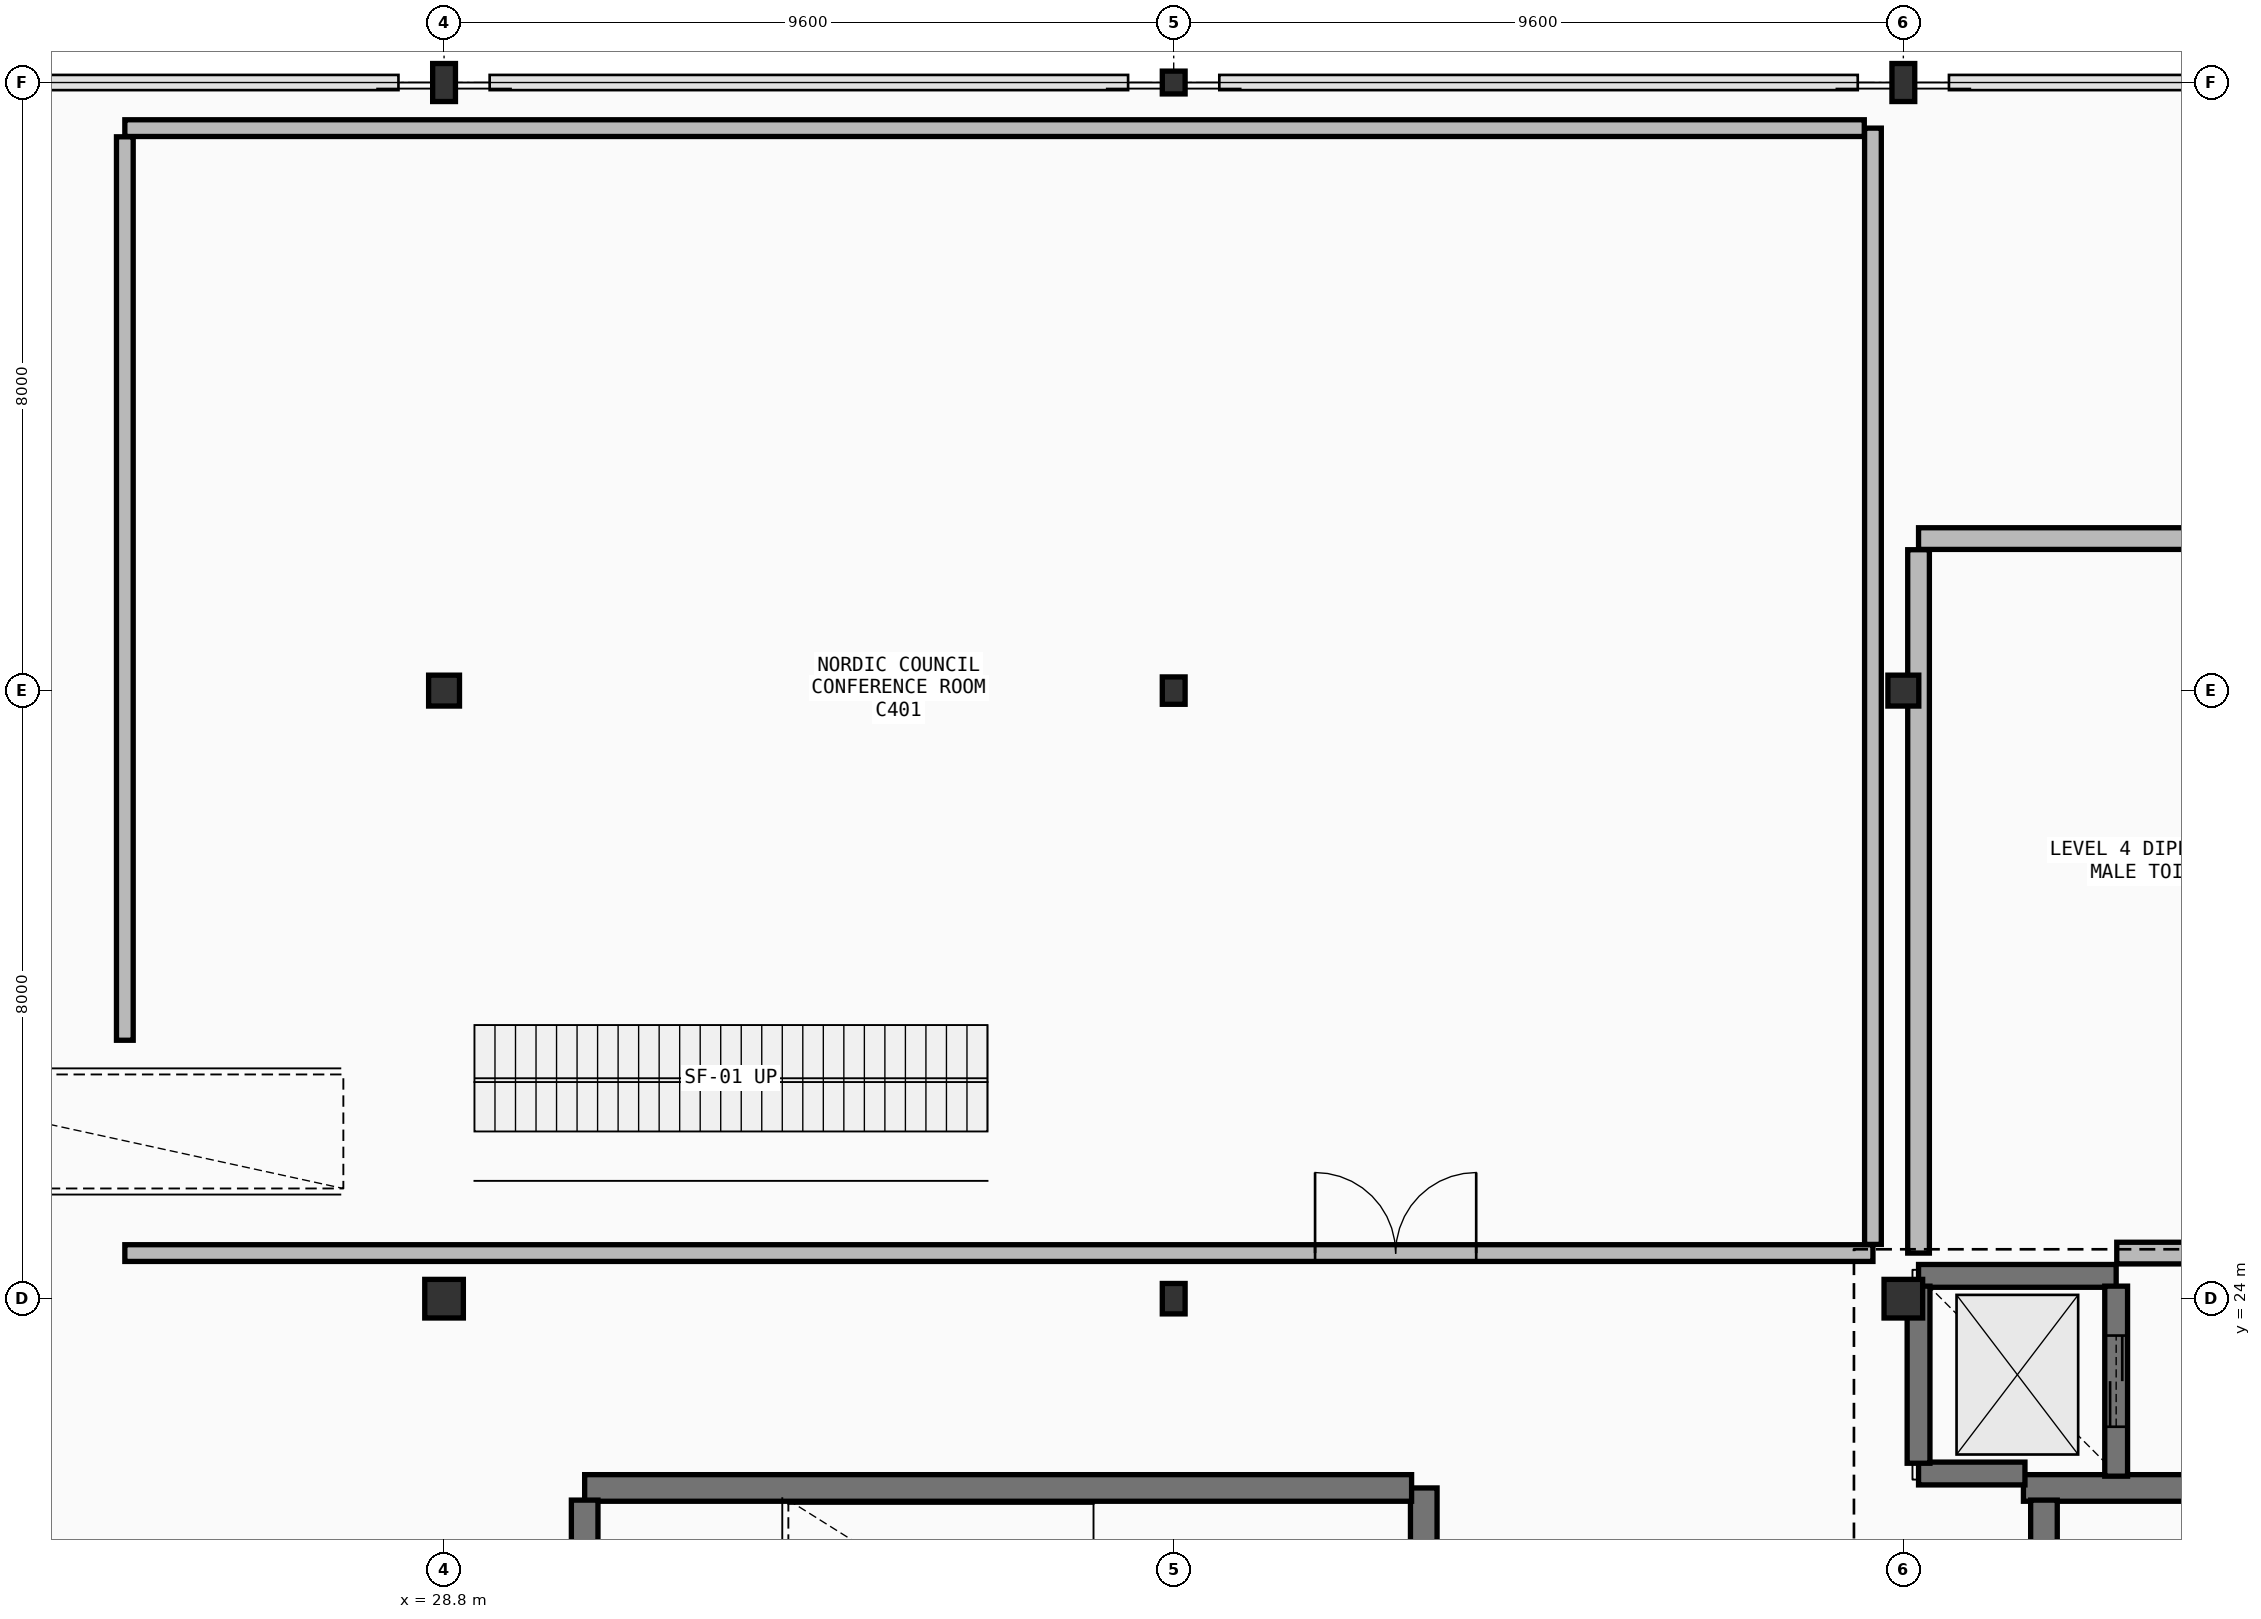
"""IFC4 building model, lengths in metres.
Left out: names, types, materials, properties, quantities, classifications, styles, units other than length and angle.
Written with IfcOpenShell. Run it as: python <this file> out.ifc"""

import sys

from ifc_helpers import new_model, si_unit, direction, frame, frame_2d, origin, origin_2d, place, context, subcontext, project, spatial, rectangle, hollow_circle, i_section, extrude, element, fill, save


model = new_model("IFC4")
c1 = context("Model", 3, precision=1e-05, world=origin(), true_north=direction((0.0, 1.0)))
c2 = subcontext(c1, "Body", "Model", "MODEL_VIEW")
j1 = project(units=[si_unit("LENGTHUNIT", "METRE"), si_unit("PLANEANGLEUNIT", "RADIAN")], contexts=[c1])
p1 = place(None, origin())
s1 = spatial("IfcSite", under=j1, at=p1, CompositionType="ELEMENT")
p2 = place(p1, origin())
s2 = spatial("IfcBuilding", under=s1, at=p2, CompositionType="ELEMENT")
p3 = place(p2, frame((0.0, 0.0, 20.4)))
s3 = spatial("IfcBuildingStorey", under=s2, at=p3, CompositionType="ELEMENT", Elevation=20.4)
p4 = place(p3, frame((28.8, 24.0, 0.0), z_axis=(0.0, 0.0, 1.0), x_axis=(1.0, 0.0, 0.0)))
e1 = element("IfcColumn", 1, at=p4, inside=s3, PredefinedType="COLUMN", context=c2, shape_type="SweptSolid", body=[
    extrude(hollow_circle(Radius=0.254, WallThickness=0.025, at=origin_2d()), origin(), (0.0, 0.0, 1.0), 4.5),
])
p5 = place(p3, frame((28.8, 32.0, 0.0), z_axis=(0.0, 0.0, 1.0), x_axis=(1.0, 0.0, 0.0)))
e2 = element("IfcColumn", 2, at=p5, inside=s3, PredefinedType="COLUMN", context=c2, shape_type="SweptSolid", body=[
    extrude(hollow_circle(Radius=0.203, WallThickness=0.02, at=origin_2d()), origin(), (0.0, 0.0, 1.0), 4.5),
])
p6 = place(p3, frame((28.8, 40.0, 0.0), z_axis=(0.0, 0.0, 1.0), x_axis=(1.0, 0.0, 0.0)))
e3 = element("IfcColumn", 3, at=p6, inside=s3, PredefinedType="COLUMN", context=c2, shape_type="SweptSolid", body=[
    extrude(i_section(OverallWidth=0.3, OverallDepth=0.5, WebThickness=0.014, FlangeThickness=0.028, FilletRadius=0.027, at=origin_2d()), origin(), (0.0, 0.0, 1.0), 4.5),
])
p7 = place(p3, frame((38.4, 24.0, 0.0), z_axis=(0.0, 0.0, 1.0), x_axis=(1.0, 0.0, 0.0)))
e4 = element("IfcColumn", 4, at=p7, inside=s3, PredefinedType="COLUMN", context=c2, shape_type="SweptSolid", body=[
    extrude(i_section(OverallWidth=0.3, OverallDepth=0.4, WebThickness=0.013, FlangeThickness=0.024, FilletRadius=0.027, at=origin_2d()), origin(), (0.0, 0.0, 1.0), 4.5),
])
p8 = place(p3, frame((38.4, 32.0, 0.0), z_axis=(0.0, 0.0, 1.0), x_axis=(1.0, 0.0, 0.0)))
e5 = element("IfcColumn", 5, at=p8, inside=s3, PredefinedType="COLUMN", context=c2, shape_type="SweptSolid", body=[
    extrude(i_section(OverallWidth=0.3, OverallDepth=0.36, WebThickness=0.012, FlangeThickness=0.022, FilletRadius=0.027, at=origin_2d()), origin(), (0.0, 0.0, 1.0), 4.5),
])
p9 = place(p3, frame((38.4, 40.0, 0.0), z_axis=(0.0, 0.0, 1.0), x_axis=(1.0, 0.0, 0.0)))
e6 = element("IfcColumn", 6, at=p9, inside=s3, PredefinedType="COLUMN", context=c2, shape_type="SweptSolid", body=[
    extrude(i_section(OverallWidth=0.3, OverallDepth=0.3, WebThickness=0.011, FlangeThickness=0.019, FilletRadius=0.027, at=origin_2d()), origin(), (0.0, 0.0, 1.0), 4.5),
])
p10 = place(p3, frame((48.0, 24.0, 0.0), z_axis=(0.0, 0.0, 1.0), x_axis=(1.0, 0.0, 0.0)))
e7 = element("IfcColumn", 7, at=p10, inside=s3, PredefinedType="COLUMN", context=c2, shape_type="SweptSolid", body=[
    extrude(hollow_circle(Radius=0.254, WallThickness=0.025, at=origin_2d()), origin(), (0.0, 0.0, 1.0), 4.5),
])
p11 = place(p3, frame((48.0, 32.0, 0.0), z_axis=(0.0, 0.0, 1.0), x_axis=(1.0, 0.0, 0.0)))
e8 = element("IfcColumn", 8, at=p11, inside=s3, PredefinedType="COLUMN", context=c2, shape_type="SweptSolid", body=[
    extrude(hollow_circle(Radius=0.203, WallThickness=0.02, at=origin_2d()), origin(), (0.0, 0.0, 1.0), 4.5),
])
p12 = place(p3, frame((48.0, 40.0, 0.0), z_axis=(0.0, 0.0, 1.0), x_axis=(1.0, 0.0, 0.0)))
e9 = element("IfcColumn", 9, at=p12, inside=s3, PredefinedType="COLUMN", context=c2, shape_type="SweptSolid", body=[
    extrude(i_section(OverallWidth=0.3, OverallDepth=0.5, WebThickness=0.014, FlangeThickness=0.028, FilletRadius=0.027, at=origin_2d()), origin(), (0.0, 0.0, 1.0), 4.5),
])
p13 = place(p3, frame((60.73, 21.51, 0.0), z_axis=(0.0, 0.0, 1.0), x_axis=(-1.0, 0.0, 0.0)))
e10 = element("IfcWall", 10, at=p13, inside=s3, PredefinedType="SHEAR", context=c2, shape_type="SweptSolid", body=[
    extrude(rectangle(XDim=11.15, YDim=0.35, at=frame_2d((5.575, 0.0))), origin(), (0.0, 0.0, 1.0), 4.25),
])
p14 = place(p3, frame((49.85, 21.35, 0.0), z_axis=(0.0, 0.0, 1.0), x_axis=(0.0, -1.0, 0.0)))
e11 = element("IfcWall", 11, at=p14, inside=s3, PredefinedType="SHEAR", context=c2, shape_type="SweptSolid", body=[
    extrude(rectangle(XDim=5.14, YDim=0.35, at=frame_2d((2.57, 0.0))), origin(), (0.0, 0.0, 1.0), 4.25),
])
p15 = place(p3, frame((41.69, 16.21, 0.0), z_axis=(0.0, 0.0, 1.0), x_axis=(0.0, 1.0, 0.0)))
e12 = element("IfcWall", 12, at=p15, inside=s3, PredefinedType="SHEAR", context=c2, shape_type="SweptSolid", body=[
    extrude(rectangle(XDim=5.3, YDim=0.35, at=frame_2d((2.65, 0.0))), origin(), (0.0, 0.0, 1.0), 4.25),
])
p16 = place(p3, frame((41.53, 21.51, 0.0), z_axis=(0.0, 0.0, 1.0), x_axis=(-1.0, 0.0, 0.0)))
e13 = element("IfcWall", 13, at=p16, inside=s3, PredefinedType="SHEAR", context=c2, shape_type="SweptSolid", body=[
    extrude(rectangle(XDim=10.88, YDim=0.35, at=frame_2d((5.44, 0.0))), origin(), (0.0, 0.0, 1.0), 4.25),
])
p17 = place(p3, frame((30.65, 21.35, 0.0), z_axis=(0.0, 0.0, 1.0), x_axis=(0.0, -1.0, 0.0)))
e14 = element("IfcWall", 14, at=p17, inside=s3, PredefinedType="SHEAR", context=c2, shape_type="SweptSolid", body=[
    extrude(rectangle(XDim=5.14, YDim=0.35, at=frame_2d((2.57, 0.0))), origin(), (0.0, 0.0, 1.0), 4.25),
])
p18 = place(p3, frame((50.8, 24.3, 0.0), z_axis=(0.0, 0.0, 1.0), x_axis=(-1.0, 0.0, 0.0)))
e15 = element("IfcWall", 15, at=p18, inside=s3, PredefinedType="SHEAR", context=c2, shape_type="SweptSolid", body=[
    extrude(rectangle(XDim=2.6, YDim=0.3, at=frame_2d((1.3, 0.0))), origin(), (0.0, 0.0, 1.0), 4.25),
])
p19 = place(p3, frame((48.2, 21.7, 0.0), z_axis=(0.0, 0.0, 1.0), x_axis=(1.0, 0.0, 0.0)))
e16 = element("IfcWall", 16, at=p19, inside=s3, PredefinedType="SHEAR", context=c2, shape_type="SweptSolid", body=[
    extrude(rectangle(XDim=1.4, YDim=0.3, at=frame_2d((0.7, 0.0))), origin(), (0.0, 0.0, 1.0), 4.25),
])
p20 = place(p3, frame((50.8, 21.665, 0.0), z_axis=(0.0, 0.0, 1.0), x_axis=(0.0, 1.0, 0.0)))
e17 = element("IfcWall", 17, at=p20, inside=s3, PredefinedType="SHEAR", context=c2, shape_type="SweptSolid", body=[
    extrude(rectangle(XDim=2.5, YDim=0.3, at=frame_2d((1.25, 0.0))), origin(), (0.0, 0.0, 1.0), 4.25),
])
p21 = place(p20, frame((0.65, 0.0, 0.0)))
e18 = element("IfcOpeningElement", 18, at=p21, cuts=e17, PredefinedType="OPENING", context=c2, shape_type="SweptSolid", body=[
    extrude(rectangle(XDim=1.2, YDim=2.2, at=frame_2d((0.6, 1.1))), frame((0.0, 0.16, 0.0), z_axis=(0.0, -1.0, 0.0), x_axis=(1.0, 0.0, 0.0)), (0.0, 0.0, 1.0), 0.32),
])
p22 = place(p3, frame((48.2, 24.165, 0.0), z_axis=(0.0, 0.0, 1.0), x_axis=(0.0, -1.0, 0.0)))
e19 = element("IfcWall", 19, at=p22, inside=s3, PredefinedType="SHEAR", context=c2, shape_type="SweptSolid", body=[
    extrude(rectangle(XDim=2.33, YDim=0.3, at=frame_2d((1.165, 0.0))), origin(), (0.0, 0.0, 1.0), 4.25),
])
p23 = place(p3, frame((24.6, 24.6, 0.0), z_axis=(0.0, 0.0, 1.0), x_axis=(1.0, 0.0, 0.0)))
e20 = element("IfcWall", 20, at=p23, inside=s3, PredefinedType="PARTITIONING", context=c2, shape_type="SweptSolid", body=[
    extrude(rectangle(XDim=23.0, YDim=0.22, at=frame_2d((11.5, 0.0))), origin(), (0.0, 0.0, 1.0), 3.32),
])
p24 = place(p23, frame((15.66, 0.0, 0.0)))
e21 = element("IfcOpeningElement", 21, at=p24, cuts=e20, PredefinedType="OPENING", context=c2, shape_type="SweptSolid", body=[
    extrude(rectangle(XDim=2.12, YDim=2.38, at=frame_2d((1.06, 1.19))), frame((0.0, 0.12, 0.0), z_axis=(0.0, -1.0, 0.0), x_axis=(1.0, 0.0, 0.0)), (0.0, 0.0, 1.0), 0.24),
])
p25 = place(p3, frame((47.6, 24.714, 0.0), z_axis=(0.0, 0.0, 1.0), x_axis=(0.0, 1.0, 0.0)))
e22 = element("IfcWall", 22, at=p25, inside=s3, PredefinedType="PARTITIONING", context=c2, shape_type="SweptSolid", body=[
    extrude(rectangle(XDim=14.686, YDim=0.22, at=frame_2d((7.343, 0.0))), origin(), (0.0, 0.0, 1.0), 3.62),
])
p26 = place(p3, frame((47.486, 39.4, 0.0), z_axis=(0.0, 0.0, 1.0), x_axis=(-1.0, 0.0, 0.0)))
e23 = element("IfcWall", 23, at=p26, inside=s3, PredefinedType="PARTITIONING", context=c2, shape_type="SweptSolid", body=[
    extrude(rectangle(XDim=22.886, YDim=0.22, at=frame_2d((11.443, 0.0))), origin(), (0.0, 0.0, 1.0), 3.52),
])
p27 = place(p3, frame((24.6, 39.286, 0.0), z_axis=(0.0, 0.0, 1.0), x_axis=(0.0, -1.0, 0.0)))
e24 = element("IfcWall", 24, at=p27, inside=s3, PredefinedType="PARTITIONING", context=c2, shape_type="SweptSolid", body=[
    extrude(rectangle(XDim=11.886, YDim=0.22, at=frame_2d((5.943, 0.0))), origin(), (0.0, 0.0, 1.0), 3.42),
])
p28 = place(p3, frame((50.808, 24.6, 0.0), z_axis=(0.0, 0.0, 1.0), x_axis=(1.0, 0.0, 0.0)))
e25 = element("IfcWall", 25, at=p28, inside=s3, PredefinedType="PLUMBINGWALL", context=c2, shape_type="SweptSolid", body=[
    extrude(rectangle(XDim=3.592, YDim=0.285, at=frame_2d((1.796, 0.0))), origin(), (0.0, 0.0, 1.0), 4.25),
])
p29 = place(p28, frame((1.393, 0.0, 0.0)))
e26 = element("IfcOpeningElement", 26, at=p29, cuts=e25, PredefinedType="OPENING", context=c2, shape_type="SweptSolid", body=[
    extrude(rectangle(XDim=1.06, YDim=2.16, at=frame_2d((0.53, 1.08))), frame((0.0, 0.152, 0.0), z_axis=(0.0, -1.0, 0.0), x_axis=(1.0, 0.0, 0.0)), (0.0, 0.0, 1.0), 0.305),
])
p30 = place(p3, frame((54.253, 34.0, 0.0), z_axis=(0.0, 0.0, 1.0), x_axis=(-1.0, 0.0, 0.0)))
e27 = element("IfcWall", 27, at=p30, inside=s3, PredefinedType="PLUMBINGWALL", context=c2, shape_type="SweptSolid", body=[
    extrude(rectangle(XDim=6.053, YDim=0.285, at=frame_2d((3.027, 0.0))), origin(), (0.0, 0.0, 1.0), 4.25),
])
p31 = place(p3, frame((48.2, 33.854, 0.0), z_axis=(0.0, 0.0, 1.0), x_axis=(0.0, -1.0, 0.0)))
e28 = element("IfcWall", 28, at=p31, inside=s3, PredefinedType="PLUMBINGWALL", context=c2, shape_type="SweptSolid", body=[
    extrude(rectangle(XDim=9.253, YDim=0.285, at=frame_2d((4.627, 0.0))), origin(), (0.0, 0.0, 1.0), 3.62),
])
p32 = place(p21, origin())
e29 = element("IfcDoor", 29, at=p32, inside=s3, OperationType="DOUBLE_DOOR_SLIDING", PredefinedType="DOOR", context=c2, shape_type="SweptSolid", body=[
    extrude(rectangle(XDim=1.2, YDim=2.2, at=frame_2d((0.6, 1.1))), frame((0.0, 0.025, 0.0), z_axis=(0.0, -1.0, 0.0), x_axis=(1.0, 0.0, 0.0)), (0.0, 0.0, 1.0), 0.05),
])
fill(e18, e29)
p33 = place(p24, origin())
e30 = element("IfcDoor", 30, at=p33, inside=s3, OperationType="DOUBLE_DOOR_SINGLE_SWING", PredefinedType="DOOR", context=c2, shape_type="SweptSolid", body=[
    extrude(rectangle(XDim=2.12, YDim=2.38, at=frame_2d((1.06, 1.19))), frame((0.0, 0.025, 0.0), z_axis=(0.0, -1.0, 0.0), x_axis=(1.0, 0.0, 0.0)), (0.0, 0.0, 1.0), 0.05),
])
fill(e21, e30)
save(model, sys.argv[1])
